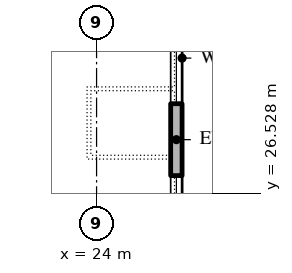
"""IFC4 building model, lengths in metres.
Left out: names, types, materials, properties, quantities, classifications, styles, units other than length and angle.
Written with IfcOpenShell. Run it as: python <this file> out.ifc"""

import sys

from ifc_helpers import new_model, si_unit, direction, frame, frame_2d, origin, place, context, subcontext, project, spatial, polyline, rectangle, outline, extrude, element, fill, save


model = new_model("IFC4")
c1 = context("Model", 3, precision=1e-05, world=origin(), true_north=direction((0.0, 1.0)))
c2 = subcontext(c1, "Body", "Model", "MODEL_VIEW")
j1 = project(units=[si_unit("LENGTHUNIT", "METRE"), si_unit("PLANEANGLEUNIT", "RADIAN")], contexts=[c1])
p1 = place(None, origin())
s1 = spatial("IfcSite", under=j1, at=p1, CompositionType="ELEMENT")
p2 = place(p1, origin())
s2 = spatial("IfcBuilding", under=s1, at=p2, CompositionType="ELEMENT")
p3 = place(p2, frame((0.0, 0.0, 369.0)))
s3 = spatial("IfcBuildingStorey", under=s2, at=p3, CompositionType="ELEMENT", Elevation=369.0)
p4 = place(p3, frame((26.1, 23.65, 0.0), z_axis=(0.0, 0.0, 1.0), x_axis=(0.0, 1.0, 0.0)))
e1 = element("IfcWall", 1, at=p4, inside=s3, PredefinedType="STANDARD", context=c2, shape_type="SweptSolid", body=[
    extrude(rectangle(XDim=8.583, YDim=0.3, at=frame_2d((4.292, 0.0))), origin(), (0.0, 0.0, 1.0), 4.0),
])
p5 = place(p4, frame((0.946, 0.0, 0.8)))
e2 = element("IfcOpeningElement", 2, at=p5, cuts=e1, PredefinedType="OPENING", context=c2, shape_type="SweptSolid", body=[
    extrude(outline(polyline([(0.0, 0.0), (2.4, 0.0), (2.4, 1.25), (2.377, 1.488), (2.31, 1.717), (2.2, 1.929), (2.051, 2.116), (1.87, 2.272), (1.663, 2.391), (1.437, 2.468), (1.2, 2.5), (0.963, 2.468), (0.737, 2.391), (0.53, 2.272), (0.349, 2.116), (0.2, 1.929), (0.09, 1.717), (0.023, 1.488), (0.0, 1.25), (0.0, 0.0)])), frame((0.0, 0.16, 0.0), z_axis=(0.0, -1.0, 0.0), x_axis=(1.0, 0.0, 0.0)), (0.0, 0.0, 1.0), 0.32),
])
p6 = place(p4, frame((5.238, 0.0, 0.8)))
e3 = element("IfcOpeningElement", 3, at=p6, cuts=e1, PredefinedType="OPENING", context=c2, shape_type="SweptSolid", body=[
    extrude(outline(polyline([(0.0, 0.0), (2.4, 0.0), (2.4, 1.25), (2.377, 1.488), (2.31, 1.717), (2.2, 1.929), (2.051, 2.116), (1.87, 2.272), (1.663, 2.391), (1.437, 2.468), (1.2, 2.5), (0.963, 2.468), (0.737, 2.391), (0.53, 2.272), (0.349, 2.116), (0.2, 1.929), (0.09, 1.717), (0.023, 1.488), (0.0, 1.25), (0.0, 0.0)])), frame((0.0, 0.16, 0.0), z_axis=(0.0, -1.0, 0.0), x_axis=(1.0, 0.0, 0.0)), (0.0, 0.0, 1.0), 0.32),
])
p7 = place(p5, origin())
e4 = element("IfcWindow", 4, at=p7, inside=s3, PartitioningType="DOUBLE_PANEL_VERTICAL", PredefinedType="WINDOW", context=c2, shape_type="SweptSolid", body=[
    extrude(outline(polyline([(0.0, 0.0), (2.4, 0.0), (2.4, 1.25), (2.377, 1.488), (2.31, 1.717), (2.2, 1.929), (2.051, 2.116), (1.87, 2.272), (1.663, 2.391), (1.437, 2.468), (1.2, 2.5), (0.963, 2.468), (0.737, 2.391), (0.53, 2.272), (0.349, 2.116), (0.2, 1.929), (0.09, 1.717), (0.023, 1.488), (0.0, 1.25), (0.0, 0.0)])), frame((0.0, 0.03, 0.0), z_axis=(0.0, -1.0, 0.0), x_axis=(1.0, 0.0, 0.0)), (0.0, 0.0, 1.0), 0.06),
])
fill(e2, e4)
p8 = place(p6, origin())
e5 = element("IfcWindow", 5, at=p8, inside=s3, PartitioningType="DOUBLE_PANEL_VERTICAL", PredefinedType="WINDOW", context=c2, shape_type="SweptSolid", body=[
    extrude(outline(polyline([(0.0, 0.0), (2.4, 0.0), (2.4, 1.25), (2.377, 1.488), (2.31, 1.717), (2.2, 1.929), (2.051, 2.116), (1.87, 2.272), (1.663, 2.391), (1.437, 2.468), (1.2, 2.5), (0.963, 2.468), (0.737, 2.391), (0.53, 2.272), (0.349, 2.116), (0.2, 1.929), (0.09, 1.717), (0.023, 1.488), (0.0, 1.25), (0.0, 0.0)])), frame((0.0, 0.03, 0.0), z_axis=(0.0, -1.0, 0.0), x_axis=(1.0, 0.0, 0.0)), (0.0, 0.0, 1.0), 0.06),
])
fill(e3, e5)
save(model, sys.argv[1])
